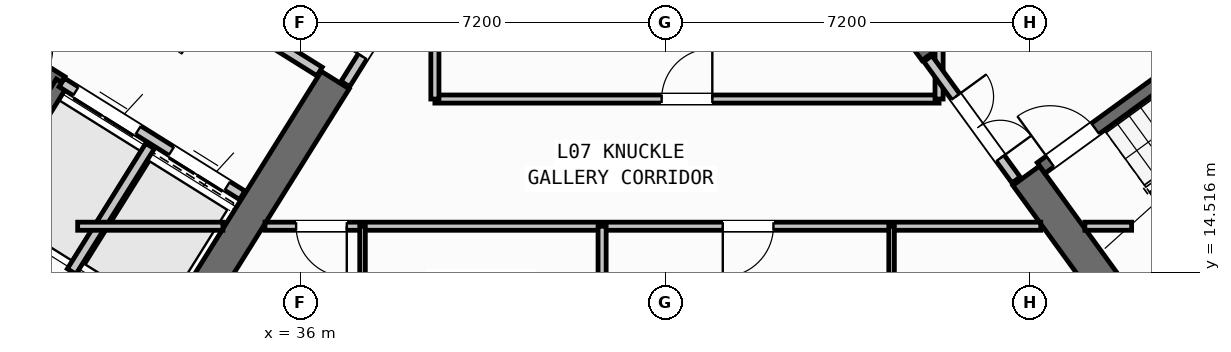
"""IFC4 building model, lengths in metres.
Left out: names, types, materials, properties, quantities, classifications, styles, units other than length and angle.
Written with IfcOpenShell. Run it as: python <this file> out.ifc"""

import sys

from ifc_helpers import new_model, si_unit, direction, frame, frame_2d, origin, place, context, subcontext, project, spatial, rectangle, extrude, source, transform, mapped, element, fill, save


model = new_model("IFC4")
c1 = context("Model", 3, precision=1e-05, world=origin(), true_north=direction((0.0, 1.0)))
c2 = subcontext(c1, "Body", "Model", "MODEL_VIEW")
j1 = project(units=[si_unit("LENGTHUNIT", "METRE"), si_unit("PLANEANGLEUNIT", "RADIAN")], contexts=[c1])
p1 = place(None, origin())
s1 = spatial("IfcSite", under=j1, at=p1, CompositionType="ELEMENT")
p2 = place(p1, origin())
s2 = spatial("IfcBuilding", under=s1, at=p2, CompositionType="ELEMENT")
p3 = place(p2, frame((0.0, 0.0, 31.2)))
s3 = spatial("IfcBuildingStorey", under=s2, at=p3, CompositionType="ELEMENT", Elevation=31.2)
p4 = place(p3, frame((33.409, 12.45, 0.0), z_axis=(0.0, 0.0, 1.0), x_axis=(-0.848051132073, 0.529914405721, 0.0)))
e1 = element("IfcWall", 1, at=p4, inside=s3, PredefinedType="SHEAR", context=c2, shape_type="SweptSolid", body=[
    extrude(rectangle(XDim=13.24, YDim=0.65, at=frame_2d((6.62, 0.0))), origin(), (0.0, 0.0, 1.0), 3.35),
])
p5 = place(p3, frame((36.683, 18.304, 0.0), z_axis=(0.0, 0.0, 1.0), x_axis=(-0.529899109053, -0.848060690178, 0.0)))
e2 = element("IfcWall", 2, at=p5, inside=s3, PredefinedType="SHEAR", context=c2, shape_type="SweptSolid", body=[
    extrude(rectangle(XDim=6.375, YDim=0.65, at=frame_2d((3.188, 0.0))), origin(), (0.0, 0.0, 1.0), 3.35),
])
p6 = place(p3, frame((52.318, 13.11, 0.0), z_axis=(0.0, 0.0, 1.0), x_axis=(0.809019445368, 0.587781878776, 0.0)))
e3 = element("IfcWall", 3, at=p6, inside=s3, PredefinedType="SHEAR", context=c2, shape_type="SweptSolid", body=[
    extrude(rectangle(XDim=12.44, YDim=0.65, at=frame_2d((6.22, 0.0))), origin(), (0.0, 0.0, 1.0), 3.35),
])
p7 = place(p3, frame((52.39, 13.564, 0.0), z_axis=(0.0, 0.0, 1.0), x_axis=(-0.58779688989, 0.809008539037, 0.0)))
e4 = element("IfcWall", 4, at=p7, inside=s3, PredefinedType="SHEAR", context=c2, shape_type="SweptSolid", body=[
    extrude(rectangle(XDim=3.525, YDim=0.65, at=frame_2d((1.763, 0.0))), origin(), (0.0, 0.0, 1.0), 3.35),
])
p8 = place(p3, frame((48.526, 18.884, 0.0), z_axis=(0.0, 0.0, 1.0), x_axis=(-0.58777996584, 0.809020835181, 0.0)))
e5 = element("IfcWall", 5, at=p8, inside=s3, PredefinedType="SHEAR", context=c2, shape_type="SweptSolid", body=[
    extrude(rectangle(XDim=6.375, YDim=0.65, at=frame_2d((3.188, 0.0))), origin(), (0.0, 0.0, 1.0), 3.35),
])
p9 = place(p3, frame((31.28, 18.261, 0.0), z_axis=(0.0, 0.0, 1.0), x_axis=(-0.848051618787, 0.529913626805, 0.0)))
e6 = element("IfcWall", 6, at=p9, inside=s3, PredefinedType="SHEAR", context=c2, shape_type="SweptSolid", body=[
    extrude(rectangle(XDim=7.46, YDim=0.26, at=frame_2d((3.73, 0.0))), origin(), (0.0, 0.0, 1.0), 3.35),
])
p10 = place(p9, frame((0.36, 0.0, 0.0)))
e7 = element("IfcOpeningElement", 7, at=p10, cuts=e6, PredefinedType="OPENING", context=c2, shape_type="SweptSolid", body=[
    extrude(rectangle(XDim=0.86, YDim=2.05, at=frame_2d((0.43, 1.025))), frame((0.0, 0.14, 0.0), z_axis=(0.0, -1.0, 0.0), x_axis=(1.0, 0.0, 0.0)), (0.0, 0.0, 1.0), 0.28),
])
p11 = place(p3, frame((31.288, 18.256, 0.0), z_axis=(0.0, 0.0, 1.0), x_axis=(-0.529943379326, -0.848033026897, 0.0)))
e8 = element("IfcWall", 8, at=p11, inside=s3, PredefinedType="SHEAR", context=c2, shape_type="SweptSolid", body=[
    extrude(rectangle(XDim=3.16, YDim=0.26, at=frame_2d((1.58, 0.0))), origin(), (0.0, 0.0, 1.0), 3.35),
])
p12 = place(p3, frame((34.848, 16.031, 0.0), z_axis=(0.0, 0.0, 1.0), x_axis=(-0.848044042236, 0.529925751807, 0.0)))
e9 = element("IfcWall", 9, at=p12, inside=s3, PredefinedType="STANDARD", context=c2, shape_type="SweptSolid", body=[
    extrude(rectangle(XDim=4.198, YDim=0.2, at=frame_2d((2.099, 0.0))), origin(), (0.0, 0.0, 1.0), 3.34),
])
p13 = place(p12, frame((0.348, 0.0, 0.0)))
e10 = element("IfcOpeningElement", 10, at=p13, cuts=e9, PredefinedType="OPENING", context=c2, shape_type="SweptSolid", body=[
    extrude(rectangle(XDim=1.3, YDim=2.2, at=frame_2d((0.65, 1.1))), frame((0.0, 0.11, 0.0), z_axis=(0.0, -1.0, 0.0), x_axis=(1.0, 0.0, 0.0)), (0.0, 0.0, 1.0), 0.22),
])
p14 = place(p12, frame((2.423, 0.0, 0.0)))
e11 = element("IfcOpeningElement", 11, at=p14, cuts=e9, PredefinedType="OPENING", context=c2, shape_type="SweptSolid", body=[
    extrude(rectangle(XDim=1.45, YDim=2.25, at=frame_2d((0.725, 1.125))), frame((0.0, 0.11, 0.0), z_axis=(0.0, -1.0, 0.0), x_axis=(1.0, 0.0, 0.0)), (0.0, 0.0, 1.0), 0.22),
])
p15 = place(p3, frame((36.374, 18.474, 0.0), z_axis=(0.0, 0.0, 1.0), x_axis=(-0.848051071577, 0.529914502535, 0.0)))
e12 = element("IfcWall", 12, at=p15, inside=s3, PredefinedType="STANDARD", context=c2, shape_type="SweptSolid", body=[
    extrude(rectangle(XDim=5.718, YDim=0.2, at=frame_2d((2.859, 0.0))), origin(), (0.0, 0.0, 1.0), 3.34),
])
p16 = place(p15, frame((2.498, 0.0, 0.0)))
e13 = element("IfcOpeningElement", 13, at=p16, cuts=e12, PredefinedType="OPENING", context=c2, shape_type="SweptSolid", body=[
    extrude(rectangle(XDim=1.15, YDim=2.1, at=frame_2d((0.575, 1.05))), frame((0.0, 0.11, 0.0), z_axis=(0.0, -1.0, 0.0), x_axis=(1.0, 0.0, 0.0)), (0.0, 0.0, 1.0), 0.22),
])
p17 = place(p3, frame((33.029, 17.003, 0.0), z_axis=(0.0, 0.0, 1.0), x_axis=(-0.529916267533, -0.848049968695, 0.0)))
e14 = element("IfcWall", 14, at=p17, inside=s3, PredefinedType="STANDARD", context=c2, shape_type="SweptSolid", body=[
    extrude(rectangle(XDim=2.92, YDim=0.2, at=frame_2d((1.46, 0.0))), origin(), (0.0, 0.0, 1.0), 3.34),
])
p18 = place(p3, frame((52.472, 14.013, 0.0), z_axis=(0.0, 0.0, 1.0), x_axis=(0.809028366311, 0.587769599847, 0.0)))
e15 = element("IfcWall", 15, at=p18, inside=s3, PredefinedType="SHEAR", context=c2, shape_type="SweptSolid", body=[
    extrude(rectangle(XDim=7.33, YDim=0.26, at=frame_2d((3.665, 0.0))), origin(), (0.0, 0.0, 1.0), 3.35),
])
p19 = place(p3, frame((50.615, 16.57, 0.0), z_axis=(0.0, 0.0, 1.0), x_axis=(0.809028366311, 0.587769599847, 0.0)))
e16 = element("IfcWall", 16, at=p19, inside=s3, PredefinedType="SHEAR", context=c2, shape_type="SweptSolid", body=[
    extrude(rectangle(XDim=7.33, YDim=0.26, at=frame_2d((3.665, 0.0))), origin(), (0.0, 0.0, 1.0), 3.35),
])
p20 = place(p19, frame((0.22, 0.0, 0.0)))
e17 = element("IfcOpeningElement", 17, at=p20, cuts=e16, PredefinedType="OPENING", context=c2, shape_type="SweptSolid", body=[
    extrude(rectangle(XDim=1.1, YDim=2.1, at=frame_2d((0.55, 1.05))), frame((0.0, 0.14, 0.0), z_axis=(0.0, -1.0, 0.0), x_axis=(1.0, 0.0, 0.0)), (0.0, 0.0, 1.0), 0.28),
])
p21 = place(p3, frame((32.164, 10.374, 0.0), z_axis=(0.0, 0.0, 1.0), x_axis=(-0.848044107957, 0.529925646633, 0.0)))
e18 = element("IfcWall", 18, at=p21, inside=s3, PredefinedType="PARTITIONING", context=c2, shape_type="SweptSolid", body=[
    extrude(rectangle(XDim=15.57, YDim=0.16, at=frame_2d((7.785, 0.0))), origin(), (0.0, 0.0, 1.0), 3.34),
])
p22 = place(p21, frame((10.83, 0.0, 0.0)))
e19 = element("IfcOpeningElement", 19, at=p22, cuts=e18, PredefinedType="OPENING", context=c2, shape_type="SweptSolid", body=[
    extrude(rectangle(XDim=1.0, YDim=2.1, at=frame_2d((0.5, 1.05))), frame((0.0, 0.09, 0.0), z_axis=(0.0, -1.0, 0.0), x_axis=(1.0, 0.0, 0.0)), (0.0, 0.0, 1.0), 0.18),
])
p23 = place(p3, frame((38.451, 20.737, 0.0), z_axis=(0.0, 0.0, 1.0), x_axis=(-0.529924799939, -0.848044637038, 0.0)))
e20 = element("IfcWall", 20, at=p23, inside=s3, PredefinedType="STANDARD", context=c2, shape_type="SweptSolid", body=[
    extrude(rectangle(XDim=2.96, YDim=0.2, at=frame_2d((1.48, 0.0))), origin(), (0.0, 0.0, 1.0), 3.34),
])
p24 = place(p23, frame((1.46, 0.0, 0.0)))
e21 = element("IfcOpeningElement", 21, at=p24, cuts=e20, PredefinedType="OPENING", context=c2, shape_type="SweptSolid", body=[
    extrude(rectangle(XDim=0.86, YDim=2.05, at=frame_2d((0.43, 1.025))), frame((0.0, 0.11, 0.0), z_axis=(0.0, -1.0, 0.0), x_axis=(1.0, 0.0, 0.0)), (0.0, 0.0, 1.0), 0.22),
])
p25 = place(p3, frame((31.6, 15.42, 0.0), z_axis=(0.0, 0.0, 1.0), x_axis=(1.0, 0.0, 0.0)))
e22 = element("IfcWall", 22, at=p25, inside=s3, PredefinedType="PARTITIONING", context=c2, shape_type="SweptSolid", body=[
    extrude(rectangle(XDim=2.866, YDim=0.16, at=frame_2d((1.433, 0.0))), origin(), (0.0, 0.0, 1.0), 3.34),
])
p26 = place(p3, frame((35.296, 15.42, 0.0), z_axis=(0.0, 0.0, 1.0), x_axis=(1.0, 0.0, 0.0)))
e23 = element("IfcWall", 23, at=p26, inside=s3, PredefinedType="PARTITIONING", context=c2, shape_type="SweptSolid", body=[
    extrude(rectangle(XDim=15.311, YDim=0.16, at=frame_2d((7.655, 0.0))), origin(), (0.0, 0.0, 1.0), 3.34),
])
p27 = place(p26, frame((0.615, 0.0, 0.0)))
e24 = element("IfcOpeningElement", 24, at=p27, cuts=e23, PredefinedType="OPENING", context=c2, shape_type="SweptSolid", body=[
    extrude(rectangle(XDim=1.0, YDim=2.1, at=frame_2d((0.5, 1.05))), frame((0.0, 0.09, 0.0), z_axis=(0.0, -1.0, 0.0), x_axis=(1.0, 0.0, 0.0)), (0.0, 0.0, 1.0), 0.18),
])
p28 = place(p26, frame((9.035, 0.0, 0.0)))
e25 = element("IfcOpeningElement", 25, at=p28, cuts=e23, PredefinedType="OPENING", context=c2, shape_type="SweptSolid", body=[
    extrude(rectangle(XDim=1.0, YDim=2.1, at=frame_2d((0.5, 1.05))), frame((0.0, 0.09, 0.0), z_axis=(0.0, -1.0, 0.0), x_axis=(1.0, 0.0, 0.0)), (0.0, 0.0, 1.0), 0.18),
])
p29 = place(p3, frame((51.477, 15.42, 0.0), z_axis=(0.0, 0.0, 1.0), x_axis=(1.0, 0.0, 0.0)))
e26 = element("IfcWall", 26, at=p29, inside=s3, PredefinedType="PARTITIONING", context=c2, shape_type="SweptSolid", body=[
    extrude(rectangle(XDim=0.923, YDim=0.16, at=frame_2d((0.461, 0.0))), origin(), (0.0, 0.0, 1.0), 3.34),
])
p30 = place(p3, frame((38.65, 17.93, 0.0), z_axis=(0.0, 0.0, 1.0), x_axis=(1.0, 0.0, 0.0)))
e27 = element("IfcWall", 27, at=p30, inside=s3, PredefinedType="PARTITIONING", context=c2, shape_type="SweptSolid", body=[
    extrude(rectangle(XDim=9.95, YDim=0.16, at=frame_2d((4.975, 0.0))), origin(), (0.0, 0.0, 1.0), 3.34),
])
p31 = place(p30, frame((4.475, 0.0, 0.0)))
e28 = element("IfcOpeningElement", 28, at=p31, cuts=e27, PredefinedType="OPENING", context=c2, shape_type="SweptSolid", body=[
    extrude(rectangle(XDim=1.0, YDim=2.1, at=frame_2d((0.5, 1.05))), frame((0.0, 0.09, 0.0), z_axis=(0.0, -1.0, 0.0), x_axis=(1.0, 0.0, 0.0)), (0.0, 0.0, 1.0), 0.18),
])
p32 = place(p3, frame((38.65, 17.93, 0.0), z_axis=(0.0, 0.0, 1.0), x_axis=(0.0, 1.0, 0.0)))
e29 = element("IfcWall", 29, at=p32, inside=s3, PredefinedType="PARTITIONING", context=c2, shape_type="SweptSolid", body=[
    extrude(rectangle(XDim=2.857, YDim=0.16, at=frame_2d((1.428, 0.0))), origin(), (0.0, 0.0, 1.0), 3.34),
])
p33 = place(p3, frame((48.6, 17.93, 0.0), z_axis=(0.0, 0.0, 1.0), x_axis=(0.0, 1.0, 0.0)))
e30 = element("IfcWall", 30, at=p33, inside=s3, PredefinedType="PARTITIONING", context=c2, shape_type="SweptSolid", body=[
    extrude(rectangle(XDim=0.993, YDim=0.16, at=frame_2d((0.496, 0.0))), origin(), (0.0, 0.0, 1.0), 3.34),
])
p34 = place(p3, frame((50.119, 16.333, 0.0), z_axis=(0.0, 0.0, 1.0), x_axis=(-0.587749856981, 0.809042709391, 0.0)))
e31 = element("IfcWall", 31, at=p34, inside=s3, PredefinedType="STANDARD", context=c2, shape_type="SweptSolid", body=[
    extrude(rectangle(XDim=2.96, YDim=0.2, at=frame_2d((1.48, 0.0))), origin(), (0.0, 0.0, 1.0), 3.34),
])
p35 = place(p34, frame((0.53, 0.0, 0.0)))
e32 = element("IfcOpeningElement", 32, at=p35, cuts=e31, PredefinedType="OPENING", context=c2, shape_type="SweptSolid", body=[
    extrude(rectangle(XDim=1.5, YDim=2.15, at=frame_2d((0.75, 1.075))), frame((0.0, 0.11, 0.0), z_axis=(0.0, -1.0, 0.0), x_axis=(1.0, 0.0, 0.0)), (0.0, 0.0, 1.0), 0.22),
])
p36 = place(p3, frame((41.95, 1.96, 0.0), z_axis=(0.0, 0.0, 1.0), x_axis=(0.0, 1.0, 0.0)))
e33 = element("IfcWall", 33, at=p36, inside=s3, PredefinedType="PARTITIONING", context=c2, shape_type="SweptSolid", body=[
    extrude(rectangle(XDim=13.46, YDim=0.16, at=frame_2d((6.73, 0.0))), origin(), (0.0, 0.0, 1.0), 3.34),
])
p37 = place(p3, frame((37.222, 1.96, 0.0), z_axis=(0.0, 0.0, 1.0), x_axis=(0.0, 1.0, 0.0)))
e34 = element("IfcWall", 34, at=p37, inside=s3, PredefinedType="PARTITIONING", context=c2, shape_type="SweptSolid", body=[
    extrude(rectangle(XDim=13.46, YDim=0.11, at=frame_2d((6.73, 0.0))), origin(), (0.0, 0.0, 1.0), 3.34),
])
p38 = place(p37, frame((5.2, 0.0, 0.0)))
e35 = element("IfcOpeningElement", 35, at=p38, cuts=e34, PredefinedType="OPENING", context=c2, shape_type="SweptSolid", body=[
    extrude(rectangle(XDim=0.92, YDim=2.08, at=frame_2d((0.46, 1.04))), frame((0.0, 0.065, 0.0), z_axis=(0.0, -1.0, 0.0), x_axis=(1.0, 0.0, 0.0)), (0.0, 0.0, 1.0), 0.13),
])
p39 = place(p37, frame((10.45, 0.0, 0.0)))
e36 = element("IfcOpeningElement", 36, at=p39, cuts=e34, PredefinedType="OPENING", context=c2, shape_type="SweptSolid", body=[
    extrude(rectangle(XDim=0.88, YDim=2.08, at=frame_2d((0.44, 1.04))), frame((0.0, 0.065, 0.0), z_axis=(0.0, -1.0, 0.0), x_axis=(1.0, 0.0, 0.0)), (0.0, 0.0, 1.0), 0.13),
])
p40 = place(p3, frame((47.663, 1.96, 0.0), z_axis=(0.0, 0.0, 1.0), x_axis=(0.0, 1.0, 0.0)))
e37 = element("IfcWall", 37, at=p40, inside=s3, PredefinedType="PARTITIONING", context=c2, shape_type="SweptSolid", body=[
    extrude(rectangle(XDim=13.46, YDim=0.11, at=frame_2d((6.73, 0.0))), origin(), (0.0, 0.0, 1.0), 3.34),
])
p41 = place(p40, frame((6.3, 0.0, 0.0)))
e38 = element("IfcOpeningElement", 38, at=p41, cuts=e37, PredefinedType="OPENING", context=c2, shape_type="SweptSolid", body=[
    extrude(rectangle(XDim=0.92, YDim=2.08, at=frame_2d((0.46, 1.04))), frame((0.0, 0.065, 0.0), z_axis=(0.0, -1.0, 0.0), x_axis=(1.0, 0.0, 0.0)), (0.0, 0.0, 1.0), 0.13),
])
p42 = place(p40, frame((11.1, 0.0, 0.0)))
e39 = element("IfcOpeningElement", 39, at=p42, cuts=e37, PredefinedType="OPENING", context=c2, shape_type="SweptSolid", body=[
    extrude(rectangle(XDim=0.88, YDim=2.08, at=frame_2d((0.44, 1.04))), frame((0.0, 0.065, 0.0), z_axis=(0.0, -1.0, 0.0), x_axis=(1.0, 0.0, 0.0)), (0.0, 0.0, 1.0), 0.13),
])
m1 = source(origin(), c2, "Body", "SweptSolid", [
    extrude(rectangle(XDim=1.3, YDim=2.2, at=frame_2d((0.65, 1.1))), frame((0.0, 0.025, 0.0), z_axis=(0.0, -1.0, 0.0), x_axis=(1.0, 0.0, 0.0)), (0.0, 0.0, 1.0), 0.05),
])
p43 = place(p13, origin())
e40 = element("IfcDoor", 40, at=p43, inside=s3, OperationType="DOUBLE_DOOR_SLIDING", PredefinedType="DOOR", context=c2, shape_type="MappedRepresentation", body=[
    mapped(m1, transform((0.0, 0.0, 0.0), scale=1.0)),
])
fill(e10, e40)
m2 = source(origin(), c2, "Body", "SweptSolid", [
    extrude(rectangle(XDim=1.45, YDim=2.25, at=frame_2d((0.725, 1.125))), frame((0.0, 0.025, 0.0), z_axis=(0.0, -1.0, 0.0), x_axis=(1.0, 0.0, 0.0)), (0.0, 0.0, 1.0), 0.05),
])
p44 = place(p14, origin())
e41 = element("IfcDoor", 41, at=p44, inside=s3, OperationType="DOUBLE_DOOR_SLIDING", PredefinedType="DOOR", context=c2, shape_type="MappedRepresentation", body=[
    mapped(m2, transform((0.0, 0.0, 0.0), scale=1.0)),
])
fill(e11, e41)
m3 = source(origin(), c2, "Body", "SweptSolid", [
    extrude(rectangle(XDim=1.1, YDim=2.1, at=frame_2d((0.55, 1.05))), frame((0.0, 0.025, 0.0), z_axis=(0.0, -1.0, 0.0), x_axis=(1.0, 0.0, 0.0)), (0.0, 0.0, 1.0), 0.05),
])
p45 = place(p20, origin())
e42 = element("IfcDoor", 42, at=p45, inside=s3, OperationType="SINGLE_SWING_LEFT", PredefinedType="DOOR", context=c2, shape_type="MappedRepresentation", body=[
    mapped(m3, transform((0.0, 0.0, 0.0), scale=1.0)),
])
fill(e17, e42)
m4 = source(origin(), c2, "Body", "SweptSolid", [
    extrude(rectangle(XDim=1.0, YDim=2.1, at=frame_2d((0.5, 1.05))), frame((0.0, 0.025, 0.0), z_axis=(0.0, -1.0, 0.0), x_axis=(1.0, 0.0, 0.0)), (0.0, 0.0, 1.0), 0.05),
])
p46 = place(p31, origin())
e43 = element("IfcDoor", 43, at=p46, inside=s3, OperationType="SINGLE_SWING_RIGHT", PredefinedType="DOOR", context=c2, shape_type="MappedRepresentation", body=[
    mapped(m4, transform((0.0, 0.0, 0.0), scale=1.0)),
])
fill(e28, e43)
m5 = source(origin(), c2, "Body", "SweptSolid", [
    extrude(rectangle(XDim=0.86, YDim=2.05, at=frame_2d((0.43, 1.025))), frame((0.0, 0.025, 0.0), z_axis=(0.0, -1.0, 0.0), x_axis=(1.0, 0.0, 0.0)), (0.0, 0.0, 1.0), 0.05),
])
p47 = place(p24, frame((0.86, 0.0, 0.0), z_axis=(0.0, 0.0, 1.0), x_axis=(-1.0, 0.0, 0.0)))
e44 = element("IfcDoor", 44, at=p47, inside=s3, OperationType="SINGLE_SWING_LEFT", PredefinedType="DOOR", context=c2, shape_type="MappedRepresentation", body=[
    mapped(m5, transform((0.0, 0.0, 0.0), scale=1.0)),
])
fill(e21, e44)
m6 = source(origin(), c2, "Body", "SweptSolid", [
    extrude(rectangle(XDim=1.5, YDim=2.15, at=frame_2d((0.75, 1.075))), frame((0.0, 0.025, 0.0), z_axis=(0.0, -1.0, 0.0), x_axis=(1.0, 0.0, 0.0)), (0.0, 0.0, 1.0), 0.05),
])
p48 = place(p35, frame((1.5, 0.0, 0.0), z_axis=(0.0, 0.0, 1.0), x_axis=(-1.0, 0.0, 0.0)))
e45 = element("IfcDoor", 45, at=p48, inside=s3, OperationType="DOUBLE_DOOR_SINGLE_SWING", PredefinedType="DOOR", context=c2, shape_type="MappedRepresentation", body=[
    mapped(m6, transform((0.0, 0.0, 0.0), scale=1.0)),
])
fill(e32, e45)
p49 = place(p27, frame((1.0, 0.0, 0.0), z_axis=(0.0, 0.0, 1.0), x_axis=(-1.0, 0.0, 0.0)))
e46 = element("IfcDoor", 46, at=p49, inside=s3, OperationType="SINGLE_SWING_LEFT", PredefinedType="DOOR", context=c2, shape_type="MappedRepresentation", body=[
    mapped(m4, transform((0.0, 0.0, 0.0), scale=1.0)),
])
fill(e24, e46)
p50 = place(p28, frame((1.0, 0.0, 0.0), z_axis=(0.0, 0.0, 1.0), x_axis=(-1.0, 0.0, 0.0)))
e47 = element("IfcDoor", 47, at=p50, inside=s3, OperationType="SINGLE_SWING_RIGHT", PredefinedType="DOOR", context=c2, shape_type="MappedRepresentation", body=[
    mapped(m4, transform((0.0, 0.0, 0.0), scale=1.0)),
])
fill(e25, e47)
save(model, sys.argv[1])
